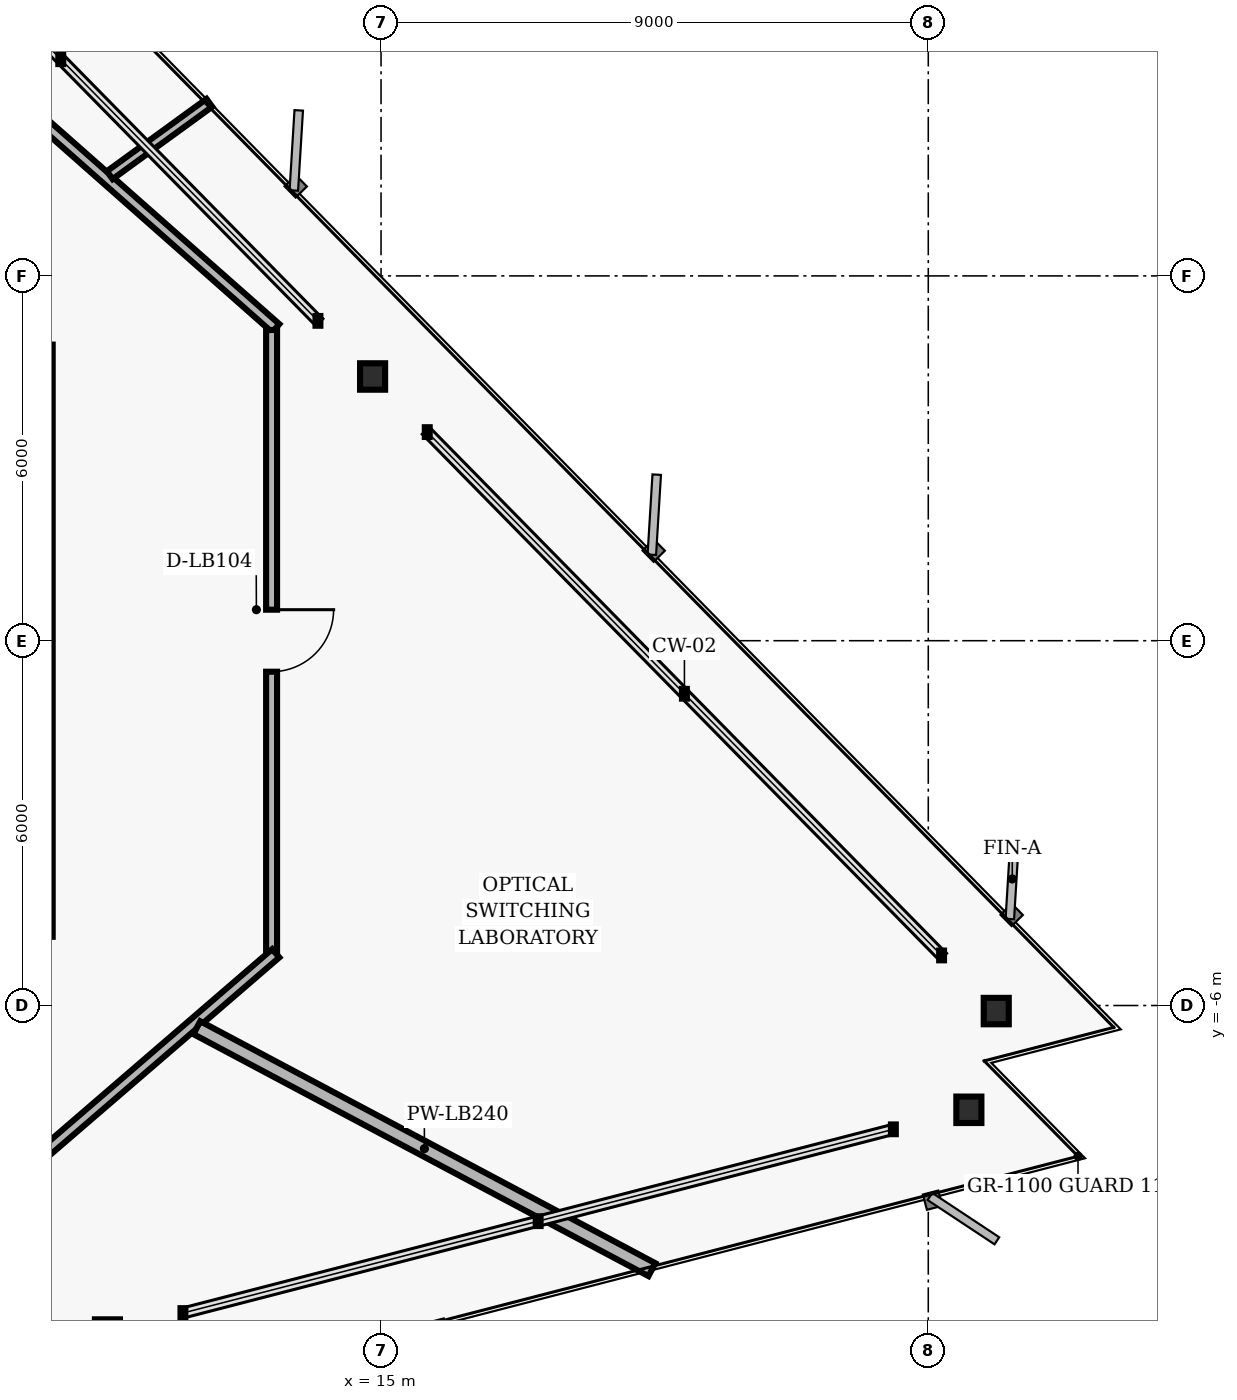
"""IFC4 building model, lengths in metres.
Left out: names, types, materials, properties, quantities, classifications, styles, units other than length and angle.
Written with IfcOpenShell. Run it as: python <this file> out.ifc"""

import sys

from ifc_helpers import new_model, si_unit, direction, frame, frame_2d, origin, origin_2d, place, context, subcontext, project, spatial, rectangle, i_section, extrude, element, fill, save


model = new_model("IFC4")
c1 = context("Model", 3, precision=1e-05, world=origin(), true_north=direction((0.0, 1.0)))
c2 = subcontext(c1, "Body", "Model", "MODEL_VIEW")
j1 = project(units=[si_unit("LENGTHUNIT", "METRE"), si_unit("PLANEANGLEUNIT", "RADIAN")], contexts=[c1])
p1 = place(None, origin())
s1 = spatial("IfcSite", under=j1, at=p1, CompositionType="ELEMENT")
p2 = place(p1, origin())
s2 = spatial("IfcBuilding", under=s1, at=p2, CompositionType="ELEMENT")
p3 = place(p2, frame((0.0, 0.0, 88.64)))
s3 = spatial("IfcBuildingStorey", under=s2, at=p3, CompositionType="ELEMENT", Elevation=88.64)
for number, where, z_axis, x_axis in (
    (1, (25.118, -6.092, 0.0), (0.0, 0.0, 1.0), (1.0, 0.0, 0.0)),
    (2, (14.861, 4.346, 0.0), (0.0, 0.0, 1.0), (1.0, 0.0, 0.0)),
    (3, (10.5, -11.379, 0.0), (0.0, 0.0, 1.0), (1.0, 0.0, 0.0)),
    (4, (24.667, -7.715, 0.0), (0.0, 0.0, 1.0), (1.0, 0.0, 0.0)),
):
    element("IfcColumn", number, at=place(p3, frame(where, z_axis=z_axis, x_axis=x_axis)), inside=s3, PredefinedType="COLUMN", context=c2, shape_type="SweptSolid", body=[
        extrude(i_section(OverallWidth=0.412, OverallDepth=0.435, WebThickness=0.036, FlangeThickness=0.057, FilletRadius=0.022, at=origin_2d()), origin(), (0.0, 0.0, 1.0), 3.04),
    ])
p4 = place(p3, frame((8.567, 9.29, 0.0), z_axis=(0.0, 0.0, 1.0), x_axis=(0.749626463267, -0.66186113768, 0.0)))
e5 = element("IfcWall", 5, at=p4, inside=s3, PredefinedType="PARTITIONING", context=c2, shape_type="SweptSolid", body=[
    extrude(rectangle(XDim=6.27, YDim=0.18, at=frame_2d((3.135, 0.0))), origin(), (0.0, 0.0, 1.0), 2.277),
])
p5 = place(p3, frame((13.2, 5.11, 0.0), z_axis=(0.0, 0.0, 1.0), x_axis=(0.0, -1.0, 0.0)))
e6 = element("IfcWall", 6, at=p5, inside=s3, PredefinedType="PARTITIONING", context=c2, shape_type="SweptSolid", body=[
    extrude(rectangle(XDim=10.22, YDim=0.18, at=frame_2d((5.11, 0.0))), origin(), (0.0, 0.0, 1.0), 2.277),
])
p6 = place(p5, frame((4.6, 0.0, 0.0)))
e7 = element("IfcOpeningElement", 7, at=p6, cuts=e6, PredefinedType="OPENING", context=c2, shape_type="SweptSolid", body=[
    extrude(rectangle(XDim=1.02, YDim=2.02, at=frame_2d((0.51, 1.01))), frame((0.0, 0.1, 0.0), z_axis=(0.0, -1.0, 0.0), x_axis=(1.0, 0.0, 0.0)), (0.0, 0.0, 1.0), 0.2),
])
p7 = place(p3, frame((13.268, -5.141, 0.0), z_axis=(0.0, 0.0, 1.0), x_axis=(-0.757534501725, -0.65279512766, 0.0)))
e8 = element("IfcWall", 8, at=p7, inside=s3, PredefinedType="PARTITIONING", context=c2, shape_type="SweptSolid", body=[
    extrude(rectangle(XDim=6.385, YDim=0.18, at=frame_2d((3.192, 0.0))), origin(), (0.0, 0.0, 1.0), 2.763),
])
p8 = place(p3, frame((11.971, -6.365, 0.0), z_axis=(0.0, 0.0, 1.0), x_axis=(0.882953434006, -0.469460577021, 0.0)))
e9 = element("IfcWall", 9, at=p8, inside=s3, PredefinedType="PARTITIONING", context=c2, shape_type="SweptSolid", body=[
    extrude(rectangle(XDim=8.476, YDim=0.24, at=frame_2d((4.238, 0.0))), origin(), (0.0, 0.0, 1.0), 2.763),
])
p9 = place(p3, frame((10.539, 7.657, 0.0), z_axis=(0.0, 0.0, 1.0), x_axis=(0.809038430179, 0.587755747308, 0.0)))
e10 = element("IfcWall", 10, at=p9, inside=s3, PredefinedType="PARTITIONING", context=c2, shape_type="SweptSolid", body=[
    extrude(rectangle(XDim=2.025, YDim=0.16, at=frame_2d((1.012, 0.0))), origin(), (0.0, 0.0, 1.0), 2.763),
])
p10 = place(p6, origin())
e11 = element("IfcDoor", 11, at=p10, inside=s3, OperationType="SINGLE_SWING_LEFT", PredefinedType="DOOR", context=c2, shape_type="SweptSolid", body=[
    extrude(rectangle(XDim=1.02, YDim=2.02, at=frame_2d((0.51, 1.01))), frame((0.0, 0.025, 0.0), z_axis=(0.0, -1.0, 0.0), x_axis=(1.0, 0.0, 0.0)), (0.0, 0.0, 1.0), 0.05),
])
fill(e7, e11)
save(model, sys.argv[1])
